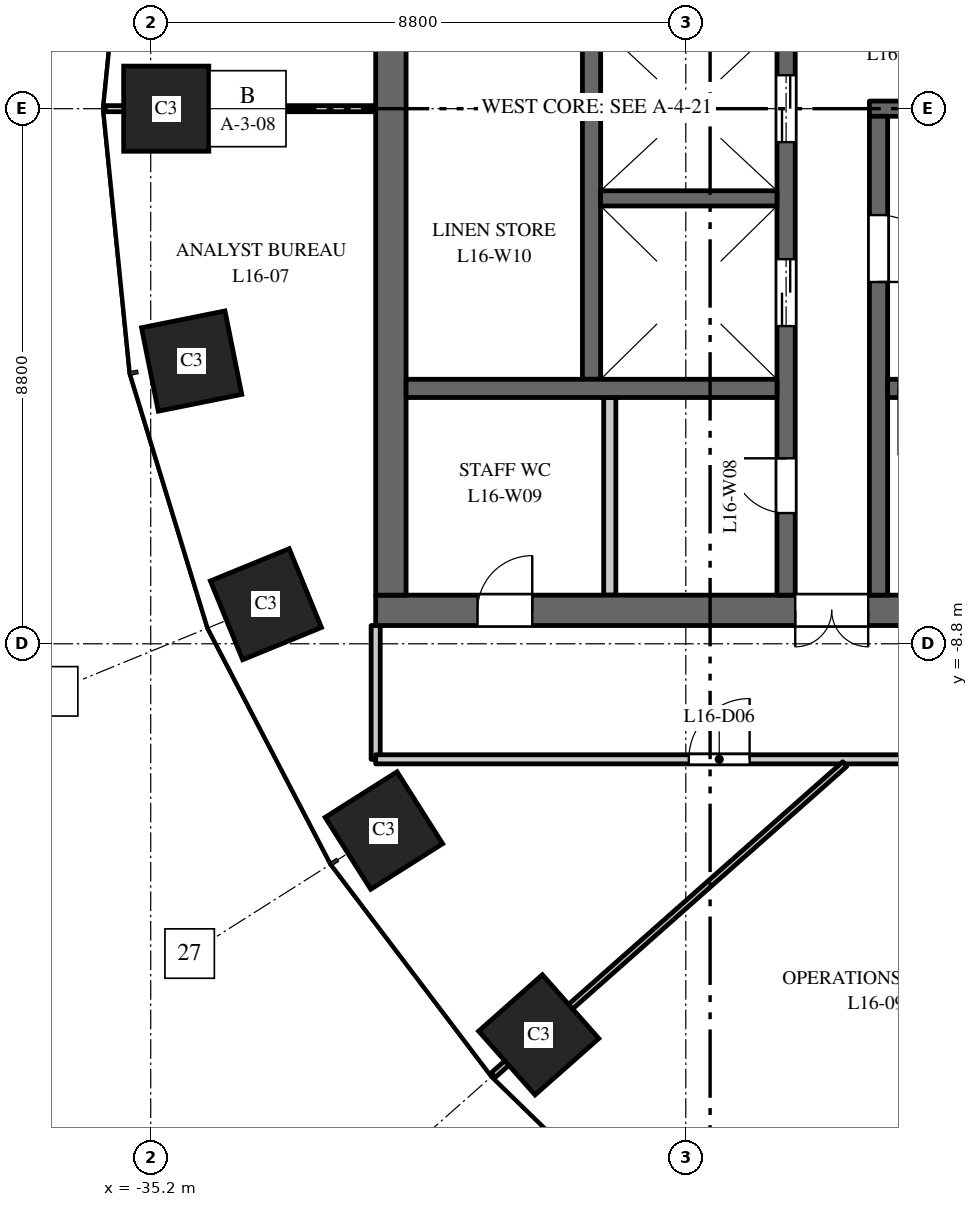
"""IFC4 building model, lengths in metres.
Left out: names, types, materials, properties, quantities, classifications, styles, units other than length and angle.
Written with IfcOpenShell. Run it as: python <this file> out.ifc"""

import sys

from ifc_helpers import new_model, si_unit, direction, frame, frame_2d, origin, origin_2d, place, context, subcontext, project, spatial, rectangle, extrude, element, fill, save


model = new_model("IFC4")
c1 = context("Model", 3, precision=1e-05, world=origin(), true_north=direction((0.0, 1.0)))
c2 = subcontext(c1, "Body", "Model", "MODEL_VIEW")
j1 = project(units=[si_unit("LENGTHUNIT", "METRE"), si_unit("PLANEANGLEUNIT", "RADIAN")], contexts=[c1])
p1 = place(None, origin())
s1 = spatial("IfcSite", under=j1, at=p1, CompositionType="ELEMENT")
p2 = place(p1, origin())
s2 = spatial("IfcBuilding", under=s1, at=p2, CompositionType="ELEMENT")
p3 = place(p2, frame((0.0, 0.0, 74.5)))
s3 = spatial("IfcBuildingStorey", under=s2, at=p3, CompositionType="ELEMENT", Elevation=74.5)
for number, where, z_axis, x_axis in (
    (1, (-34.945, 0.0, 0.0), (0.0, 0.0, 1.0), (0.0, -1.0, 0.0)),
    (2, (-34.527, -4.151, 0.0), (0.0, 0.0, 1.0), (0.197, -0.98, 0.0)),
    (3, (-33.305, -8.149, 0.0), (0.0, 0.0, 1.0), (0.379, -0.925, 0.0)),
    (4, (-31.365, -11.871, 0.0), (0.0, 0.0, 1.0), (0.535, -0.845, 0.0)),
    (5, (-28.819, -15.23, 0.0), (0.0, 0.0, 1.0), (0.663, -0.749, 0.0)),
):
    element("IfcColumn", number, at=place(p3, frame(where, z_axis=z_axis, x_axis=x_axis)), inside=s3, PredefinedType="COLUMN", context=c2, shape_type="SweptSolid", body=[
        extrude(rectangle(XDim=1.4, YDim=1.4, at=origin_2d()), origin(), (0.0, 0.0, 1.0), 4.0),
    ])
p4 = place(p3, frame((-16.5, -8.25, 0.0), z_axis=(0.0, 0.0, 1.0), x_axis=(-1.0, 0.0, 0.0)))
e6 = element("IfcWall", 6, at=p4, inside=s3, PredefinedType="SHEAR", context=c2, shape_type="SweptSolid", body=[
    extrude(rectangle(XDim=15.0, YDim=0.5, at=frame_2d((7.5, 0.0))), origin(), (0.0, 0.0, 1.0), 3.7),
])
p5 = place(p4, frame((6.9, 0.0, 0.0)))
e7 = element("IfcOpeningElement", 7, at=p5, cuts=e6, PredefinedType="OPENING", context=c2, shape_type="SweptSolid", body=[
    extrude(rectangle(XDim=1.2, YDim=2.1, at=frame_2d((0.6, 1.05))), frame((0.0, 0.26, 0.0), z_axis=(0.0, -1.0, 0.0), x_axis=(1.0, 0.0, 0.0)), (0.0, 0.0, 1.0), 0.52),
])
p6 = place(p4, frame((12.425, 0.0, 0.0)))
e8 = element("IfcOpeningElement", 8, at=p6, cuts=e6, PredefinedType="OPENING", context=c2, shape_type="SweptSolid", body=[
    extrude(rectangle(XDim=0.9, YDim=2.1, at=frame_2d((0.45, 1.05))), frame((0.0, 0.26, 0.0), z_axis=(0.0, -1.0, 0.0), x_axis=(1.0, 0.0, 0.0)), (0.0, 0.0, 1.0), 0.52),
])
p7 = place(p3, frame((-27.95, -4.45, 0.0), z_axis=(0.0, 0.0, 1.0), x_axis=(0.0, 1.0, 0.0)))
e9 = element("IfcWall", 9, at=p7, inside=s3, PredefinedType="SHEAR", context=c2, shape_type="SweptSolid", body=[
    extrude(rectangle(XDim=8.9, YDim=0.3, at=frame_2d((4.45, 0.0))), origin(), (0.0, 0.0, 1.0), 3.7),
])
p8 = place(p3, frame((-24.75, -8.0, 0.0), z_axis=(0.0, 0.0, 1.0), x_axis=(0.0, 1.0, 0.0)))
e10 = element("IfcWall", 10, at=p8, inside=s3, PredefinedType="SHEAR", context=c2, shape_type="SweptSolid", body=[
    extrude(rectangle(XDim=16.0, YDim=0.3, at=frame_2d((8.0, 0.0))), origin(), (0.0, 0.0, 1.0), 3.7),
])
p9 = place(p8, frame((4.425, 0.0, 0.0)))
e11 = element("IfcOpeningElement", 11, at=p9, cuts=e10, PredefinedType="OPENING", context=c2, shape_type="SweptSolid", body=[
    extrude(rectangle(XDim=1.1, YDim=2.1, at=frame_2d((0.55, 1.05))), frame((0.0, 0.16, 0.0), z_axis=(0.0, -1.0, 0.0), x_axis=(1.0, 0.0, 0.0)), (0.0, 0.0, 1.0), 0.32),
])
p10 = place(p8, frame((7.45, 0.0, 0.0)))
e12 = element("IfcOpeningElement", 12, at=p10, cuts=e10, PredefinedType="OPENING", context=c2, shape_type="SweptSolid", body=[
    extrude(rectangle(XDim=1.1, YDim=2.1, at=frame_2d((0.55, 1.05))), frame((0.0, 0.16, 0.0), z_axis=(0.0, -1.0, 0.0), x_axis=(1.0, 0.0, 0.0)), (0.0, 0.0, 1.0), 0.32),
])
p11 = place(p8, frame((10.425, 0.0, 0.0)))
e13 = element("IfcOpeningElement", 13, at=p11, cuts=e10, PredefinedType="OPENING", context=c2, shape_type="SweptSolid", body=[
    extrude(rectangle(XDim=1.2, YDim=2.1, at=frame_2d((0.6, 1.05))), frame((0.0, 0.16, 0.0), z_axis=(0.0, -1.0, 0.0), x_axis=(1.0, 0.0, 0.0)), (0.0, 0.0, 1.0), 0.32),
])
p12 = place(p8, frame((13.125, 0.0, 0.0)))
e14 = element("IfcOpeningElement", 14, at=p12, cuts=e10, PredefinedType="OPENING", context=c2, shape_type="SweptSolid", body=[
    extrude(rectangle(XDim=0.9, YDim=2.1, at=frame_2d((0.45, 1.05))), frame((0.0, 0.16, 0.0), z_axis=(0.0, -1.0, 0.0), x_axis=(1.0, 0.0, 0.0)), (0.0, 0.0, 1.0), 0.32),
])
p13 = place(p8, frame((14.75, 0.0, 0.0)))
e15 = element("IfcOpeningElement", 15, at=p13, cuts=e10, PredefinedType="OPENING", context=c2, shape_type="SweptSolid", body=[
    extrude(rectangle(XDim=0.9, YDim=2.1, at=frame_2d((0.45, 1.05))), frame((0.0, 0.16, 0.0), z_axis=(0.0, -1.0, 0.0), x_axis=(1.0, 0.0, 0.0)), (0.0, 0.0, 1.0), 0.32),
])
p14 = place(p8, frame((1.35, 0.0, 0.0)))
e16 = element("IfcOpeningElement", 16, at=p14, cuts=e10, PredefinedType="OPENING", context=c2, shape_type="SweptSolid", body=[
    extrude(rectangle(XDim=0.9, YDim=2.1, at=frame_2d((0.45, 1.05))), frame((0.0, 0.16, 0.0), z_axis=(0.0, -1.0, 0.0), x_axis=(1.0, 0.0, 0.0)), (0.0, 0.0, 1.0), 0.32),
])
p15 = place(p3, frame((-20.1, 0.0, 0.0), z_axis=(0.0, 0.0, 1.0), x_axis=(-1.0, 0.0, 0.0)))
e17 = element("IfcWall", 17, at=p15, inside=s3, PredefinedType="SHEAR", context=c2, shape_type="SweptSolid", body=[
    extrude(rectangle(XDim=3.28, YDim=0.25, at=frame_2d((1.64, 0.0))), origin(), (0.0, 0.0, 1.0), 3.7),
])
p16 = place(p3, frame((-31.25, -8.0, 0.0), z_axis=(0.0, 0.0, 1.0), x_axis=(0.0, 1.0, 0.0)))
e18 = element("IfcWall", 18, at=p16, inside=s3, PredefinedType="SHEAR", context=c2, shape_type="SweptSolid", body=[
    extrude(rectangle(XDim=16.0, YDim=0.5, at=frame_2d((8.0, 0.0))), origin(), (0.0, 0.0, 1.0), 3.7),
])
p17 = place(p3, frame((-27.65, -8.0, 0.0), z_axis=(0.0, 0.0, 1.0), x_axis=(0.0, 1.0, 0.0)))
e19 = element("IfcWall", 19, at=p17, inside=s3, PredefinedType="PARTITIONING", context=c2, shape_type="SweptSolid", body=[
    extrude(rectangle(XDim=3.25, YDim=0.2, at=frame_2d((1.625, 0.0))), origin(), (0.0, 0.0, 1.0), 3.7),
])
p18 = place(p3, frame((-24.9, -4.6, 0.0), z_axis=(0.0, 0.0, 1.0), x_axis=(-1.0, 0.0, 0.0)))
e20 = element("IfcWall", 20, at=p18, inside=s3, PredefinedType="SHEAR", context=c2, shape_type="SweptSolid", body=[
    extrude(rectangle(XDim=6.1, YDim=0.3, at=frame_2d((3.05, 0.0))), origin(), (0.0, 0.0, 1.0), 3.7),
])
p19 = place(p3, frame((-24.9, -1.475, 0.0), z_axis=(0.0, 0.0, 1.0), x_axis=(-1.0, 0.0, 0.0)))
e21 = element("IfcWall", 21, at=p19, inside=s3, PredefinedType="SHEAR", context=c2, shape_type="SweptSolid", body=[
    extrude(rectangle(XDim=2.9, YDim=0.25, at=frame_2d((1.45, 0.0))), origin(), (0.0, 0.0, 1.0), 3.7),
])
p20 = place(p3, frame((-23.23, -8.0, 0.0), z_axis=(0.0, 0.0, 1.0), x_axis=(0.0, 1.0, 0.0)))
e22 = element("IfcWall", 22, at=p20, inside=s3, PredefinedType="SHEAR", context=c2, shape_type="SweptSolid", body=[
    extrude(rectangle(XDim=7.875, YDim=0.3, at=frame_2d((3.938, 0.0))), origin(), (0.0, 0.0, 1.0), 3.7),
])
p21 = place(p20, frame((5.15, 0.0, 0.0)))
e23 = element("IfcOpeningElement", 23, at=p21, cuts=e22, PredefinedType="OPENING", context=c2, shape_type="SweptSolid", body=[
    extrude(rectangle(XDim=1.1, YDim=2.1, at=frame_2d((0.55, 1.05))), frame((0.0, 0.16, 0.0), z_axis=(0.0, -1.0, 0.0), x_axis=(1.0, 0.0, 0.0)), (0.0, 0.0, 1.0), 0.32),
])
p22 = place(p3, frame((-16.9, -4.6, 0.0), z_axis=(0.0, 0.0, 1.0), x_axis=(-1.0, 0.0, 0.0)))
e24 = element("IfcWall", 24, at=p22, inside=s3, PredefinedType="SHEAR", context=c2, shape_type="SweptSolid", body=[
    extrude(rectangle(XDim=6.18, YDim=0.3, at=frame_2d((3.09, 0.0))), origin(), (0.0, 0.0, 1.0), 3.7),
])
p23 = place(p22, frame((4.9, 0.0, 0.0)))
e25 = element("IfcOpeningElement", 25, at=p23, cuts=e24, PredefinedType="OPENING", context=c2, shape_type="SweptSolid", body=[
    extrude(rectangle(XDim=1.1, YDim=2.1, at=frame_2d((0.55, 1.05))), frame((0.0, 0.16, 0.0), z_axis=(0.0, -1.0, 0.0), x_axis=(1.0, 0.0, 0.0)), (0.0, 0.0, 1.0), 0.32),
])
p24 = place(p3, frame((-35.949, 0.0, 0.0), z_axis=(0.0, 0.0, 1.0), x_axis=(1.0, 0.0, 0.0)))
e26 = element("IfcWall", 26, at=p24, inside=s3, PredefinedType="PARTITIONING", context=c2, shape_type="SweptSolid", body=[
    extrude(rectangle(XDim=4.449, YDim=0.1, at=frame_2d((2.225, 0.0))), origin(), (0.0, 0.0, 1.0), 2.85),
])
p25 = place(p3, frame((-31.5, -10.7, 0.0), z_axis=(0.0, 0.0, 1.0), x_axis=(0.0, 1.0, 0.0)))
e27 = element("IfcWall", 27, at=p25, inside=s3, PredefinedType="PARTITIONING", context=c2, shape_type="SweptSolid", body=[
    extrude(rectangle(XDim=2.2, YDim=0.15, at=frame_2d((1.1, 0.0))), origin(), (0.0, 0.0, 1.0), 3.7),
])
p26 = place(p3, frame((-31.5, -10.7, 0.0), z_axis=(0.0, 0.0, 1.0), x_axis=(1.0, 0.0, 0.0)))
e28 = element("IfcWall", 28, at=p26, inside=s3, PredefinedType="PARTITIONING", context=c2, shape_type="SweptSolid", body=[
    extrude(rectangle(XDim=8.961, YDim=0.15, at=frame_2d((4.48, 0.0))), origin(), (0.0, 0.0, 1.0), 3.1),
])
p27 = place(p26, frame((5.15, 0.0, 0.0)))
e29 = element("IfcOpeningElement", 29, at=p27, cuts=e28, PredefinedType="OPENING", context=c2, shape_type="SweptSolid", body=[
    extrude(rectangle(XDim=1.0, YDim=2.1, at=frame_2d((0.5, 1.05))), frame((0.0, 0.085, 0.0), z_axis=(0.0, -1.0, 0.0), x_axis=(1.0, 0.0, 0.0)), (0.0, 0.0, 1.0), 0.17),
])
p28 = place(p3, frame((-29.569, -15.895, 0.0), z_axis=(0.0, 0.0, 1.0), x_axis=(0.748985701008, 0.662586160198, 0.0)))
e30 = element("IfcWall", 30, at=p28, inside=s3, PredefinedType="PARTITIONING", context=c2, shape_type="SweptSolid", body=[
    extrude(rectangle(XDim=7.723, YDim=0.1, at=frame_2d((3.861, 0.0))), origin(), (0.0, 0.0, 1.0), 2.85),
])
p29 = place(p9, origin())
e31 = element("IfcDoor", 31, at=p29, inside=s3, OperationType="DOUBLE_DOOR_SLIDING", PredefinedType="DOOR", context=c2, shape_type="SweptSolid", body=[
    extrude(rectangle(XDim=1.1, YDim=2.1, at=frame_2d((0.55, 1.05))), frame((0.0, 0.025, 0.0), z_axis=(0.0, -1.0, 0.0), x_axis=(1.0, 0.0, 0.0)), (0.0, 0.0, 1.0), 0.05),
])
fill(e11, e31)
p30 = place(p10, origin())
e32 = element("IfcDoor", 32, at=p30, inside=s3, OperationType="DOUBLE_DOOR_SLIDING", PredefinedType="DOOR", context=c2, shape_type="SweptSolid", body=[
    extrude(rectangle(XDim=1.1, YDim=2.1, at=frame_2d((0.55, 1.05))), frame((0.0, 0.025, 0.0), z_axis=(0.0, -1.0, 0.0), x_axis=(1.0, 0.0, 0.0)), (0.0, 0.0, 1.0), 0.05),
])
fill(e12, e32)
p31 = place(p23, origin())
e33 = element("IfcDoor", 33, at=p31, inside=s3, OperationType="SINGLE_SWING_LEFT", PredefinedType="DOOR", context=c2, shape_type="SweptSolid", body=[
    extrude(rectangle(XDim=1.1, YDim=2.1, at=frame_2d((0.55, 1.05))), frame((0.0, 0.025, 0.0), z_axis=(0.0, -1.0, 0.0), x_axis=(1.0, 0.0, 0.0)), (0.0, 0.0, 1.0), 0.05),
])
fill(e25, e33)
p32 = place(p21, origin())
e34 = element("IfcDoor", 34, at=p32, inside=s3, OperationType="SINGLE_SWING_LEFT", PredefinedType="DOOR", context=c2, shape_type="SweptSolid", body=[
    extrude(rectangle(XDim=1.1, YDim=2.1, at=frame_2d((0.55, 1.05))), frame((0.0, 0.025, 0.0), z_axis=(0.0, -1.0, 0.0), x_axis=(1.0, 0.0, 0.0)), (0.0, 0.0, 1.0), 0.05),
])
fill(e23, e34)
p33 = place(p5, origin())
e35 = element("IfcDoor", 35, at=p33, inside=s3, OperationType="DOUBLE_DOOR_DOUBLE_SWING", PredefinedType="DOOR", context=c2, shape_type="SweptSolid", body=[
    extrude(rectangle(XDim=1.2, YDim=2.1, at=frame_2d((0.6, 1.05))), frame((0.0, 0.025, 0.0), z_axis=(0.0, -1.0, 0.0), x_axis=(1.0, 0.0, 0.0)), (0.0, 0.0, 1.0), 0.05),
])
fill(e7, e35)
p34 = place(p14, origin())
e36 = element("IfcDoor", 36, at=p34, inside=s3, OperationType="SINGLE_SWING_LEFT", PredefinedType="DOOR", context=c2, shape_type="SweptSolid", body=[
    extrude(rectangle(XDim=0.9, YDim=2.1, at=frame_2d((0.45, 1.05))), frame((0.0, 0.025, 0.0), z_axis=(0.0, -1.0, 0.0), x_axis=(1.0, 0.0, 0.0)), (0.0, 0.0, 1.0), 0.05),
])
fill(e16, e36)
p35 = place(p6, origin())
e37 = element("IfcDoor", 37, at=p35, inside=s3, OperationType="SINGLE_SWING_LEFT", PredefinedType="DOOR", context=c2, shape_type="SweptSolid", body=[
    extrude(rectangle(XDim=0.9, YDim=2.1, at=frame_2d((0.45, 1.05))), frame((0.0, 0.025, 0.0), z_axis=(0.0, -1.0, 0.0), x_axis=(1.0, 0.0, 0.0)), (0.0, 0.0, 1.0), 0.05),
])
fill(e8, e37)
p36 = place(p27, origin())
e38 = element("IfcDoor", 38, at=p36, inside=s3, OperationType="SINGLE_SWING_RIGHT", PredefinedType="DOOR", context=c2, shape_type="SweptSolid", body=[
    extrude(rectangle(XDim=1.0, YDim=2.1, at=frame_2d((0.5, 1.05))), frame((0.0, 0.025, 0.0), z_axis=(0.0, -1.0, 0.0), x_axis=(1.0, 0.0, 0.0)), (0.0, 0.0, 1.0), 0.05),
])
fill(e29, e38)
save(model, sys.argv[1])
